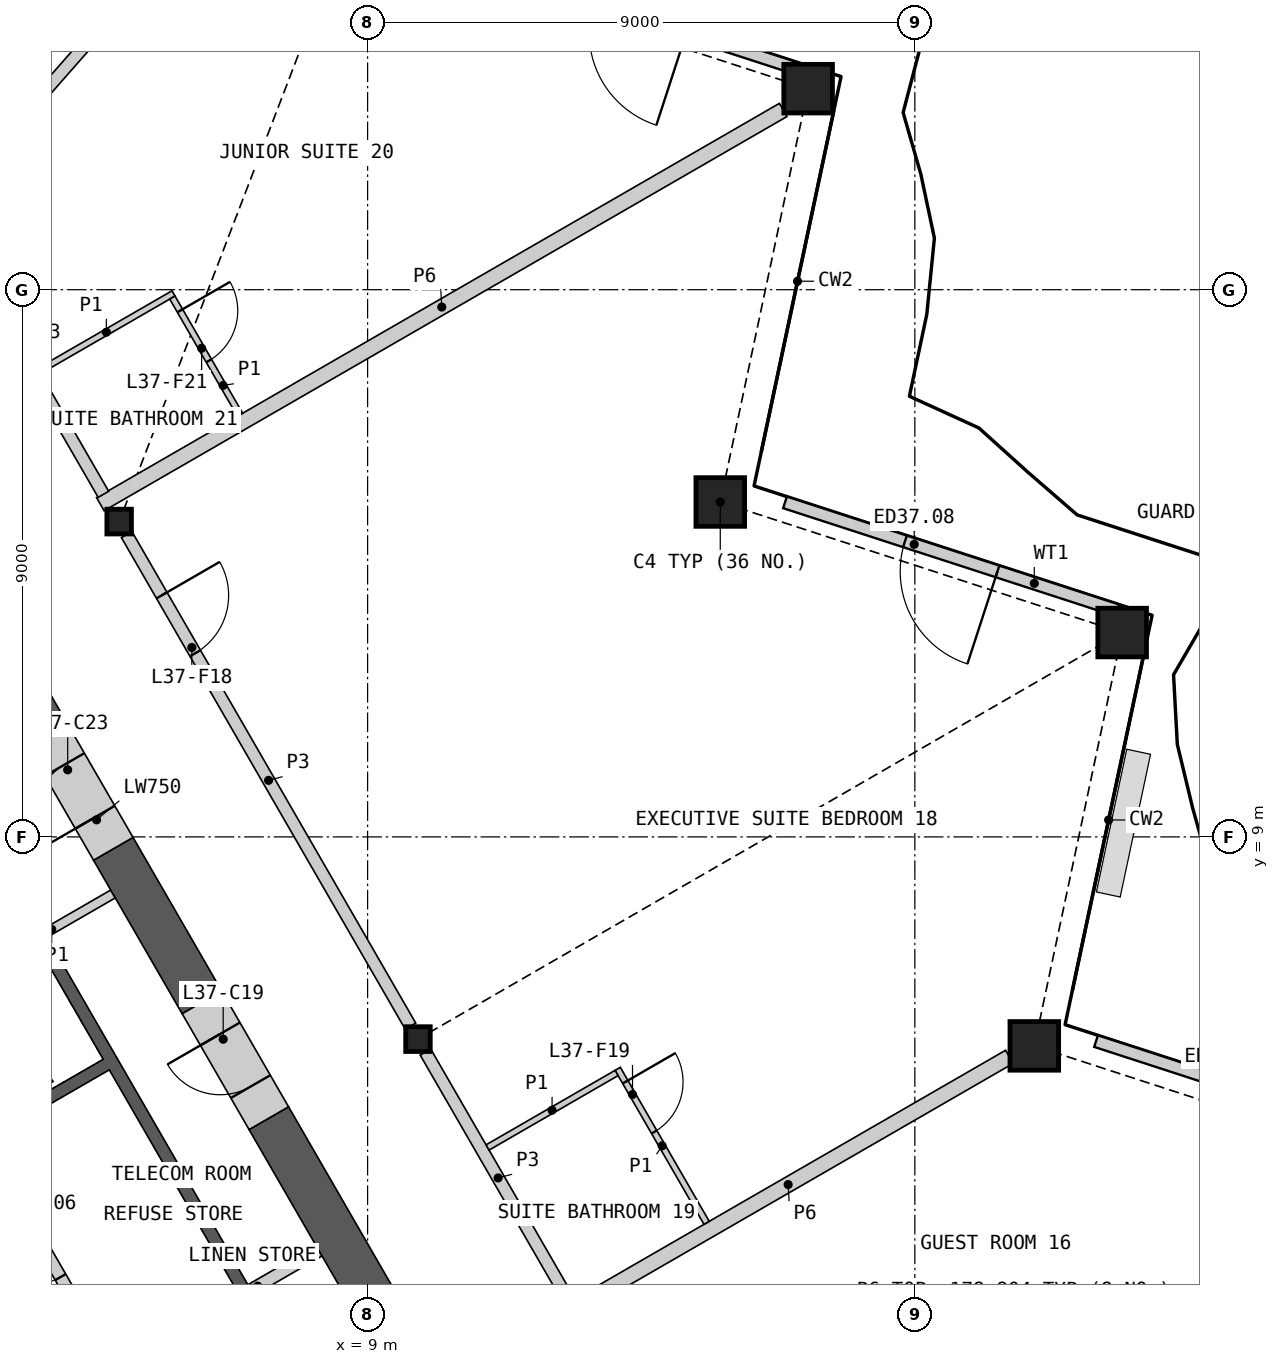
"""IFC4 building model, lengths in metres.
Left out: names, types, materials, properties, quantities, classifications, styles, units other than length and angle.
Written with IfcOpenShell. Run it as: python <this file> out.ifc"""

import sys

from ifc_helpers import new_model, si_unit, direction, frame, frame_2d, origin, origin_2d, place, context, subcontext, project, spatial, polyline, rectangle, hollow_rectangle, i_section, outline, extrude, element, fill, save


model = new_model("IFC4")
c1 = context("Model", 3, precision=1e-05, world=origin(), true_north=direction((0.0, 1.0)))
c2 = subcontext(c1, "Body", "Model", "MODEL_VIEW")
j1 = project(units=[si_unit("LENGTHUNIT", "METRE"), si_unit("PLANEANGLEUNIT", "RADIAN")], contexts=[c1])
p1 = place(None, origin())
s1 = spatial("IfcSite", under=j1, at=p1, CompositionType="ELEMENT")
p2 = place(p1, origin())
s2 = spatial("IfcBuilding", under=s1, at=p2, CompositionType="ELEMENT")
p3 = place(p2, frame((0.0, 0.0, 176.4)))
s3 = spatial("IfcBuildingStorey", under=s2, at=p3, CompositionType="ELEMENT", Elevation=176.4)
for number, where, z_axis, x_axis in (
    (1, (19.965, 5.563, 0.0), (0.0, 0.0, 1.0), (1.0, 0.0, 0.0)),
    (2, (21.409, 12.361, 0.0), (0.0, 0.0, 1.0), (1.0, 0.0, 0.0)),
    (3, (14.8, 14.508, 0.0), (0.0, 0.0, 1.0), (1.0, 0.0, 0.0)),
    (4, (16.245, 21.306, 0.0), (0.0, 0.0, 1.0), (1.0, 0.0, 0.0)),
):
    element("IfcColumn", number, at=place(p3, frame(where, z_axis=z_axis, x_axis=x_axis)), inside=s3, PredefinedType="COLUMN", context=c2, shape_type="SweptSolid", body=[
        extrude(hollow_rectangle(XDim=0.8, YDim=0.8, WallThickness=0.05, at=origin_2d()), origin(), (0.0, 0.0, 1.0), 3.6),
    ])
for number, where, z_axis, x_axis in (
    (5, (9.828, 5.675, 0.0), (0.0, 0.0, 1.0), (1.0, 0.0, 0.0)),
    (6, (4.914, 14.186, 0.0), (0.0, 0.0, 1.0), (1.0, 0.0, 0.0)),
):
    element("IfcColumn", number, at=place(p3, frame(where, z_axis=z_axis, x_axis=x_axis)), inside=s3, PredefinedType="COLUMN", context=c2, shape_type="SweptSolid", body=[
        extrude(i_section(OverallWidth=0.404, OverallDepth=0.407, WebThickness=0.027, FlangeThickness=0.044, at=origin_2d()), origin(), (0.0, 0.0, 1.0), 3.6),
    ])
p4 = place(p3, frame((26.447, 3.865, 0.0), z_axis=(0.0, 0.0, 1.0), x_axis=(-0.951043432761, 0.309057258453, 0.0)))
e7 = element("IfcWall", 7, at=p4, inside=s3, PredefinedType="SOLIDWALL", context=c2, shape_type="SweptSolid", body=[
    extrude(rectangle(XDim=5.748, YDim=0.2, at=frame_2d((2.874, 0.0))), origin(), (0.0, 0.0, 1.0), 2.701),
])
p5 = place(p4, frame((2.074, 0.0, 0.0)))
e8 = element("IfcOpeningElement", 8, at=p5, cuts=e7, PredefinedType="OPENING", context=c2, shape_type="SweptSolid", body=[
    extrude(rectangle(XDim=1.6, YDim=2.4, at=frame_2d((0.8, 1.2))), frame((0.0, 0.11, 0.0), z_axis=(0.0, -1.0, 0.0), x_axis=(1.0, 0.0, 0.0)), (0.0, 0.0, 1.0), 0.22),
])
p6 = place(p3, frame((21.331, 12.726, 0.0), z_axis=(0.0, 0.0, 1.0), x_axis=(-0.95105997304, 0.309006355405, 0.0)))
e9 = element("IfcWall", 9, at=p6, inside=s3, PredefinedType="SOLIDWALL", context=c2, shape_type="SweptSolid", body=[
    extrude(rectangle(XDim=5.748, YDim=0.2, at=frame_2d((2.874, 0.0))), origin(), (0.0, 0.0, 1.0), 2.701),
])
p7 = place(p6, frame((2.074, 0.0, 0.0)))
e10 = element("IfcOpeningElement", 10, at=p7, cuts=e9, PredefinedType="OPENING", context=c2, shape_type="SweptSolid", body=[
    extrude(rectangle(XDim=1.6, YDim=2.4, at=frame_2d((0.8, 1.2))), frame((0.0, 0.11, 0.0), z_axis=(0.0, -1.0, 0.0), x_axis=(1.0, 0.0, 0.0)), (0.0, 0.0, 1.0), 0.22),
])
p8 = place(p3, frame((16.216, 21.586, 0.0), z_axis=(0.0, 0.0, 1.0), x_axis=(-0.95105997304, 0.309006355405, 0.0)))
e11 = element("IfcWall", 11, at=p8, inside=s3, PredefinedType="SOLIDWALL", context=c2, shape_type="SweptSolid", body=[
    extrude(rectangle(XDim=5.748, YDim=0.2, at=frame_2d((2.874, 0.0))), origin(), (0.0, 0.0, 1.0), 2.701),
])
p9 = place(p8, frame((2.074, 0.0, 0.0)))
e12 = element("IfcOpeningElement", 12, at=p9, cuts=e11, PredefinedType="OPENING", context=c2, shape_type="SweptSolid", body=[
    extrude(rectangle(XDim=1.6, YDim=2.4, at=frame_2d((0.8, 1.2))), frame((0.0, 0.11, 0.0), z_axis=(0.0, -1.0, 0.0), x_axis=(1.0, 0.0, 0.0)), (0.0, 0.0, 1.0), 0.22),
])
p10 = place(p3, origin())
e13 = element("IfcWall", 13, at=p10, inside=s3, PredefinedType="SHEAR", context=c2, shape_type="SweptSolid", body=[
    extrude(outline(polyline([(1.561, 6.097), (3.731, 7.35), (7.131, 1.461), (4.96, 0.208), (4.861, 0.381), (6.852, 1.531), (4.752, 5.169), (2.76, 4.019), (2.66, 4.192), (4.652, 5.342), (3.652, 7.074), (1.66, 5.924), (1.561, 6.097)])), origin(), (0.0, 0.0, 1.0), 3.25),
])
p11 = place(p3, frame((5.817, -1.476, 0.0), z_axis=(0.0, 0.0, 1.0), x_axis=(-0.500002616675, 0.866023893041, 0.0)))
e14 = element("IfcWall", 14, at=p11, inside=s3, PredefinedType="SOLIDWALL", context=c2, shape_type="SweptSolid", body=[
    extrude(rectangle(XDim=8.373, YDim=0.2, at=frame_2d((4.187, 0.0))), origin(), (0.0, 0.0, 1.0), 3.25),
])
p12 = place(p11, frame((0.437, 0.0, 0.0)))
e15 = element("IfcOpeningElement", 15, at=p12, cuts=e14, PredefinedType="OPENING", context=c2, shape_type="SweptSolid", body=[
    extrude(rectangle(XDim=0.9, YDim=2.1, at=frame_2d((0.45, 1.05))), frame((0.0, 0.11, 0.0), z_axis=(0.0, -1.0, 0.0), x_axis=(1.0, 0.0, 0.0)), (0.0, 0.0, 1.0), 0.22),
])
p13 = place(p11, frame((3.737, 0.0, 0.0)))
e16 = element("IfcOpeningElement", 16, at=p13, cuts=e14, PredefinedType="OPENING", context=c2, shape_type="SweptSolid", body=[
    extrude(rectangle(XDim=0.9, YDim=2.1, at=frame_2d((0.45, 1.05))), frame((0.0, 0.11, 0.0), z_axis=(0.0, -1.0, 0.0), x_axis=(1.0, 0.0, 0.0)), (0.0, 0.0, 1.0), 0.22),
])
p14 = place(p11, frame((6.937, 0.0, 0.0)))
e17 = element("IfcOpeningElement", 17, at=p14, cuts=e14, PredefinedType="OPENING", context=c2, shape_type="SweptSolid", body=[
    extrude(rectangle(XDim=1.1, YDim=2.1, at=frame_2d((0.55, 1.05))), frame((0.0, 0.11, 0.0), z_axis=(0.0, -1.0, 0.0), x_axis=(1.0, 0.0, 0.0)), (0.0, 0.0, 1.0), 0.22),
])
p15 = place(p3, frame((7.081, 1.548, 0.0), z_axis=(0.0, 0.0, 1.0), x_axis=(0.866003189247, 0.500038474733, 0.0)))
e18 = element("IfcWall", 18, at=p15, inside=s3, PredefinedType="SHEAR", context=c2, shape_type="SweptSolid", body=[
    extrude(rectangle(XDim=1.293, YDim=0.2, at=frame_2d((0.646, 0.0))), origin(), (0.0, 0.0, 1.0), 3.25),
])
p16 = place(p3, frame((3.693, 7.415, 0.0), z_axis=(0.0, 0.0, 1.0), x_axis=(0.866003189247, 0.500038474733, 0.0)))
e19 = element("IfcWall", 19, at=p16, inside=s3, PredefinedType="PARTITIONING", context=c2, shape_type="SweptSolid", body=[
    extrude(rectangle(XDim=1.293, YDim=0.15, at=frame_2d((0.646, 0.0))), origin(), (0.0, 0.0, 1.0), 3.25),
])
p17 = place(p3, frame((14.526, -8.011, 0.0), z_axis=(0.0, 0.0, 1.0), x_axis=(-0.499994855372, 0.866028374016, 0.0)))
e20 = element("IfcWall", 20, at=p17, inside=s3, PredefinedType="SHEAR", context=c2, shape_type="SweptSolid", body=[
    extrude(rectangle(XDim=14.301, YDim=0.75, at=frame_2d((7.15, 0.0))), origin(), (0.0, 0.0, 1.0), 3.25),
])
p18 = place(p3, frame((6.275, 6.279, 0.0), z_axis=(0.0, 0.0, 1.0), x_axis=(-0.500029273391, 0.866008502124, 0.0)))
e21 = element("IfcWall", 21, at=p18, inside=s3, PredefinedType="SHEAR", context=c2, shape_type="SweptSolid", body=[
    extrude(rectangle(XDim=2.916, YDim=0.75, at=frame_2d((1.458, 0.0))), origin(), (0.0, 0.0, 1.0), 3.25),
])
p19 = place(p3, frame((3.717, 10.709, 0.0), z_axis=(0.0, 0.0, 1.0), x_axis=(-0.500005599468, 0.866022170906, 0.0)))
e22 = element("IfcWall", 22, at=p19, inside=s3, PredefinedType="SHEAR", context=c2, shape_type="SweptSolid", body=[
    extrude(rectangle(XDim=2.662, YDim=0.75, at=frame_2d((1.331, 0.0))), origin(), (0.0, 0.0, 1.0), 3.25),
])
p20 = place(p3, frame((7.375, 4.374, 0.0), z_axis=(0.0, 0.0, 1.0), x_axis=(-0.499946605688, 0.86605622881, 0.0)))
e23 = element("IfcWall", 23, at=p20, inside=s3, PredefinedType="SHEAR", context=c2, shape_type="SweptSolid", body=[
    extrude(rectangle(XDim=2.2, YDim=0.75, at=frame_2d((1.1, 0.0))), origin(), (0.0, 0.0, 1.0), 3.25),
])
p21 = place(p20, frame((0.6, 0.0, 0.0)))
e24 = element("IfcOpeningElement", 24, at=p21, cuts=e23, PredefinedType="OPENING", context=c2, shape_type="SweptSolid", body=[
    extrude(rectangle(XDim=1.0, YDim=2.1, at=frame_2d((0.5, 1.05))), frame((0.0, 0.385, 0.0), z_axis=(0.0, -1.0, 0.0), x_axis=(1.0, 0.0, 0.0)), (0.0, 0.0, 1.0), 0.77),
])
p22 = place(p3, frame((4.817, 8.804, 0.0), z_axis=(0.0, 0.0, 1.0), x_axis=(-0.50002983664, 0.866008176907, 0.0)))
e25 = element("IfcWall", 25, at=p22, inside=s3, PredefinedType="SHEAR", context=c2, shape_type="SweptSolid", body=[
    extrude(rectangle(XDim=2.2, YDim=0.75, at=frame_2d((1.1, 0.0))), origin(), (0.0, 0.0, 1.0), 3.25),
])
p23 = place(p22, frame((0.6, 0.0, 0.0)))
e26 = element("IfcOpeningElement", 26, at=p23, cuts=e25, PredefinedType="OPENING", context=c2, shape_type="SweptSolid", body=[
    extrude(rectangle(XDim=1.0, YDim=2.1, at=frame_2d((0.5, 1.05))), frame((0.0, 0.385, 0.0), z_axis=(0.0, -1.0, 0.0), x_axis=(1.0, 0.0, 0.0)), (0.0, 0.0, 1.0), 0.77),
])
p24 = place(p3, frame((14.836, -3.249, 0.0), z_axis=(0.0, 0.0, 1.0), x_axis=(0.866022412254, 0.500005181446, 0.0)))
e27 = element("IfcWall", 27, at=p24, inside=s3, PredefinedType="PARTITIONING", context=c2, shape_type="SweptSolid", body=[
    extrude(rectangle(XDim=13.081, YDim=0.25, at=frame_2d((6.541, 0.0))), origin(), (0.0, 0.0, 1.0), 2.404),
])
p25 = place(p3, frame((4.604, 14.473, 0.0), z_axis=(0.0, 0.0, 1.0), x_axis=(0.866029765546, 0.499992445131, 0.0)))
e28 = element("IfcWall", 28, at=p25, inside=s3, PredefinedType="PARTITIONING", context=c2, shape_type="SweptSolid", body=[
    extrude(rectangle(XDim=12.968, YDim=0.25, at=frame_2d((6.484, 0.0))), origin(), (0.0, 0.0, 1.0), 2.404),
])
p26 = place(p3, frame((5.038, 13.972, 0.0), z_axis=(0.0, 0.0, 1.0), x_axis=(0.50000393355, -0.866023132736, 0.0)))
e29 = element("IfcWall", 29, at=p26, inside=s3, PredefinedType="PARTITIONING", context=c2, shape_type="SweptSolid", body=[
    extrude(rectangle(XDim=9.335, YDim=0.2, at=frame_2d((4.667, 0.0))), origin(), (0.0, 0.0, 1.0), 3.25),
])
p27 = place(p26, frame((1.154, 0.0, 0.0)))
e30 = element("IfcOpeningElement", 30, at=p27, cuts=e29, PredefinedType="OPENING", context=c2, shape_type="SweptSolid", body=[
    extrude(rectangle(XDim=1.1, YDim=2.1, at=frame_2d((0.55, 1.05))), frame((0.0, 0.11, 0.0), z_axis=(0.0, -1.0, 0.0), x_axis=(1.0, 0.0, 0.0)), (0.0, 0.0, 1.0), 0.22),
])
p28 = place(p3, frame((12.278, 1.182, 0.0), z_axis=(0.0, 0.0, 1.0), x_axis=(0.866024457297, 0.500001639361, 0.0)))
e31 = element("IfcWall", 31, at=p28, inside=s3, PredefinedType="PARTITIONING", context=c2, shape_type="SweptSolid", body=[
    extrude(rectangle(XDim=8.402, YDim=0.25, at=frame_2d((4.201, 0.0))), origin(), (0.0, 0.0, 1.0), 2.404),
])
p29 = place(p3, frame((1.913, 19.385, 0.0), z_axis=(0.0, 0.0, 1.0), x_axis=(0.499988331988, -0.866032140209, 0.0)))
e32 = element("IfcWall", 32, at=p29, inside=s3, PredefinedType="PARTITIONING", context=c2, shape_type="SweptSolid", body=[
    extrude(rectangle(XDim=5.485, YDim=0.2, at=frame_2d((2.742, 0.0))), origin(), (0.0, 0.0, 1.0), 3.25),
])
p30 = place(p29, frame((0.352, 0.0, 0.0)))
e33 = element("IfcOpeningElement", 33, at=p30, cuts=e32, PredefinedType="OPENING", context=c2, shape_type="SweptSolid", body=[
    extrude(rectangle(XDim=1.1, YDim=2.1, at=frame_2d((0.55, 1.05))), frame((0.0, 0.11, 0.0), z_axis=(0.0, -1.0, 0.0), x_axis=(1.0, 0.0, 0.0)), (0.0, 0.0, 1.0), 0.22),
])
p31 = place(p3, frame((9.952, 5.461, 0.0), z_axis=(0.0, 0.0, 1.0), x_axis=(0.499990736708, -0.866030751883, 0.0)))
e34 = element("IfcWall", 34, at=p31, inside=s3, PredefinedType="PARTITIONING", context=c2, shape_type="SweptSolid", body=[
    extrude(rectangle(XDim=4.779, YDim=0.2, at=frame_2d((2.389, 0.0))), origin(), (0.0, 0.0, 1.0), 3.25),
])
p32 = place(p3, frame((2.029, 19.373, 0.0), z_axis=(0.0, 0.0, 1.0), x_axis=(0.66019067586, 0.751098043871, 0.0)))
e35 = element("IfcWall", 35, at=p32, inside=s3, PredefinedType="PARTITIONING", context=c2, shape_type="SweptSolid", body=[
    extrude(rectangle(XDim=13.938, YDim=0.2, at=frame_2d((6.969, 0.0))), origin(), (0.0, 0.0, 1.0), 2.404),
])
p33 = place(p3, frame((13.113, 5.186, 0.0), z_axis=(0.0, 0.0, 1.0), x_axis=(0.499963291492, -0.866046596414, 0.0)))
e36 = element("IfcWall", 36, at=p33, inside=s3, PredefinedType="PARTITIONING", context=c2, shape_type="SweptSolid", body=[
    extrude(rectangle(XDim=2.925, YDim=0.1, at=frame_2d((1.462, 0.0))), origin(), (0.0, 0.0, 1.0), 2.404),
])
p34 = place(p33, frame((0.25, 0.0, 0.0)))
e37 = element("IfcOpeningElement", 37, at=p34, cuts=e36, PredefinedType="OPENING", context=c2, shape_type="SweptSolid", body=[
    extrude(rectangle(XDim=0.95, YDim=2.1, at=frame_2d((0.475, 1.05))), frame((0.0, 0.06, 0.0), z_axis=(0.0, -1.0, 0.0), x_axis=(1.0, 0.0, 0.0)), (0.0, 0.0, 1.0), 0.12),
])
p35 = place(p3, frame((3.599, 16.664, 0.0), z_axis=(0.0, 0.0, 1.0), x_axis=(0.865989465428, 0.500062241894, 0.0)))
e38 = element("IfcWall", 38, at=p35, inside=s3, PredefinedType="PARTITIONING", context=c2, shape_type="SweptSolid", body=[
    extrude(rectangle(XDim=2.55, YDim=0.1, at=frame_2d((1.275, 0.0))), origin(), (0.0, 0.0, 1.0), 2.404),
])
p36 = place(p3, frame((10.973, 3.892, 0.0), z_axis=(0.0, 0.0, 1.0), x_axis=(0.866014668023, 0.500018594424, 0.0)))
e39 = element("IfcWall", 39, at=p36, inside=s3, PredefinedType="PARTITIONING", context=c2, shape_type="SweptSolid", body=[
    extrude(rectangle(XDim=2.45, YDim=0.1, at=frame_2d((1.225, 0.0))), origin(), (0.0, 0.0, 1.0), 2.404),
])
p37 = place(p3, frame((5.789, 17.87, 0.0), z_axis=(0.0, 0.0, 1.0), x_axis=(0.49999788721, -0.866026623601, 0.0)))
e40 = element("IfcWall", 40, at=p37, inside=s3, PredefinedType="PARTITIONING", context=c2, shape_type="SweptSolid", body=[
    extrude(rectangle(XDim=2.225, YDim=0.1, at=frame_2d((1.113, 0.0))), origin(), (0.0, 0.0, 1.0), 2.404),
])
p38 = place(p37, frame((0.25, 0.0, 0.0)))
e41 = element("IfcOpeningElement", 41, at=p38, cuts=e40, PredefinedType="OPENING", context=c2, shape_type="SweptSolid", body=[
    extrude(rectangle(XDim=0.95, YDim=2.1, at=frame_2d((0.475, 1.05))), frame((0.0, 0.06, 0.0), z_axis=(0.0, -1.0, 0.0), x_axis=(1.0, 0.0, 0.0)), (0.0, 0.0, 1.0), 0.12),
])
p39 = place(p7, origin())
e42 = element("IfcDoor", 42, at=p39, inside=s3, OperationType="DOUBLE_DOOR_SINGLE_SWING", PredefinedType="DOOR", context=c2, shape_type="SweptSolid", body=[
    extrude(rectangle(XDim=1.6, YDim=2.4, at=frame_2d((0.8, 1.2))), frame((0.0, 0.025, 0.0), z_axis=(0.0, -1.0, 0.0), x_axis=(1.0, 0.0, 0.0)), (0.0, 0.0, 1.0), 0.05),
])
fill(e10, e42)
p40 = place(p13, origin())
e43 = element("IfcDoor", 43, at=p40, inside=s3, OperationType="SINGLE_SWING_RIGHT", PredefinedType="DOOR", context=c2, shape_type="SweptSolid", body=[
    extrude(rectangle(XDim=0.9, YDim=2.1, at=frame_2d((0.45, 1.05))), frame((0.0, 0.025, 0.0), z_axis=(0.0, -1.0, 0.0), x_axis=(1.0, 0.0, 0.0)), (0.0, 0.0, 1.0), 0.05),
])
fill(e16, e43)
p41 = place(p21, origin())
e44 = element("IfcDoor", 44, at=p41, inside=s3, OperationType="SINGLE_SWING_RIGHT", PredefinedType="DOOR", context=c2, shape_type="SweptSolid", body=[
    extrude(rectangle(XDim=1.0, YDim=2.1, at=frame_2d((0.5, 1.05))), frame((0.0, 0.13, 0.0), z_axis=(0.0, -1.0, 0.0), x_axis=(1.0, 0.0, 0.0)), (0.0, 0.0, 1.0), 0.05),
])
fill(e24, e44)
p42 = place(p23, origin())
e45 = element("IfcDoor", 45, at=p42, inside=s3, OperationType="SINGLE_SWING_LEFT", PredefinedType="DOOR", context=c2, shape_type="SweptSolid", body=[
    extrude(rectangle(XDim=1.0, YDim=2.1, at=frame_2d((0.5, 1.05))), frame((0.0, 0.13, 0.0), z_axis=(0.0, -1.0, 0.0), x_axis=(1.0, 0.0, 0.0)), (0.0, 0.0, 1.0), 0.05),
])
fill(e26, e45)
p43 = place(p27, origin())
e46 = element("IfcDoor", 46, at=p43, inside=s3, OperationType="SINGLE_SWING_LEFT", PredefinedType="DOOR", context=c2, shape_type="SweptSolid", body=[
    extrude(rectangle(XDim=1.1, YDim=2.1, at=frame_2d((0.55, 1.05))), frame((0.0, 0.025, 0.0), z_axis=(0.0, -1.0, 0.0), x_axis=(1.0, 0.0, 0.0)), (0.0, 0.0, 1.0), 0.05),
])
fill(e30, e46)
p44 = place(p34, origin())
e47 = element("IfcDoor", 47, at=p44, inside=s3, OperationType="SINGLE_SWING_LEFT", PredefinedType="DOOR", context=c2, shape_type="SweptSolid", body=[
    extrude(rectangle(XDim=0.95, YDim=2.1, at=frame_2d((0.475, 1.05))), frame((0.0, 0.025, 0.0), z_axis=(0.0, -1.0, 0.0), x_axis=(1.0, 0.0, 0.0)), (0.0, 0.0, 1.0), 0.05),
])
fill(e37, e47)
p45 = place(p38, origin())
e48 = element("IfcDoor", 48, at=p45, inside=s3, OperationType="SINGLE_SWING_LEFT", PredefinedType="DOOR", context=c2, shape_type="SweptSolid", body=[
    extrude(rectangle(XDim=0.95, YDim=2.1, at=frame_2d((0.475, 1.05))), frame((0.0, 0.025, 0.0), z_axis=(0.0, -1.0, 0.0), x_axis=(1.0, 0.0, 0.0)), (0.0, 0.0, 1.0), 0.05),
])
fill(e41, e48)
save(model, sys.argv[1])
